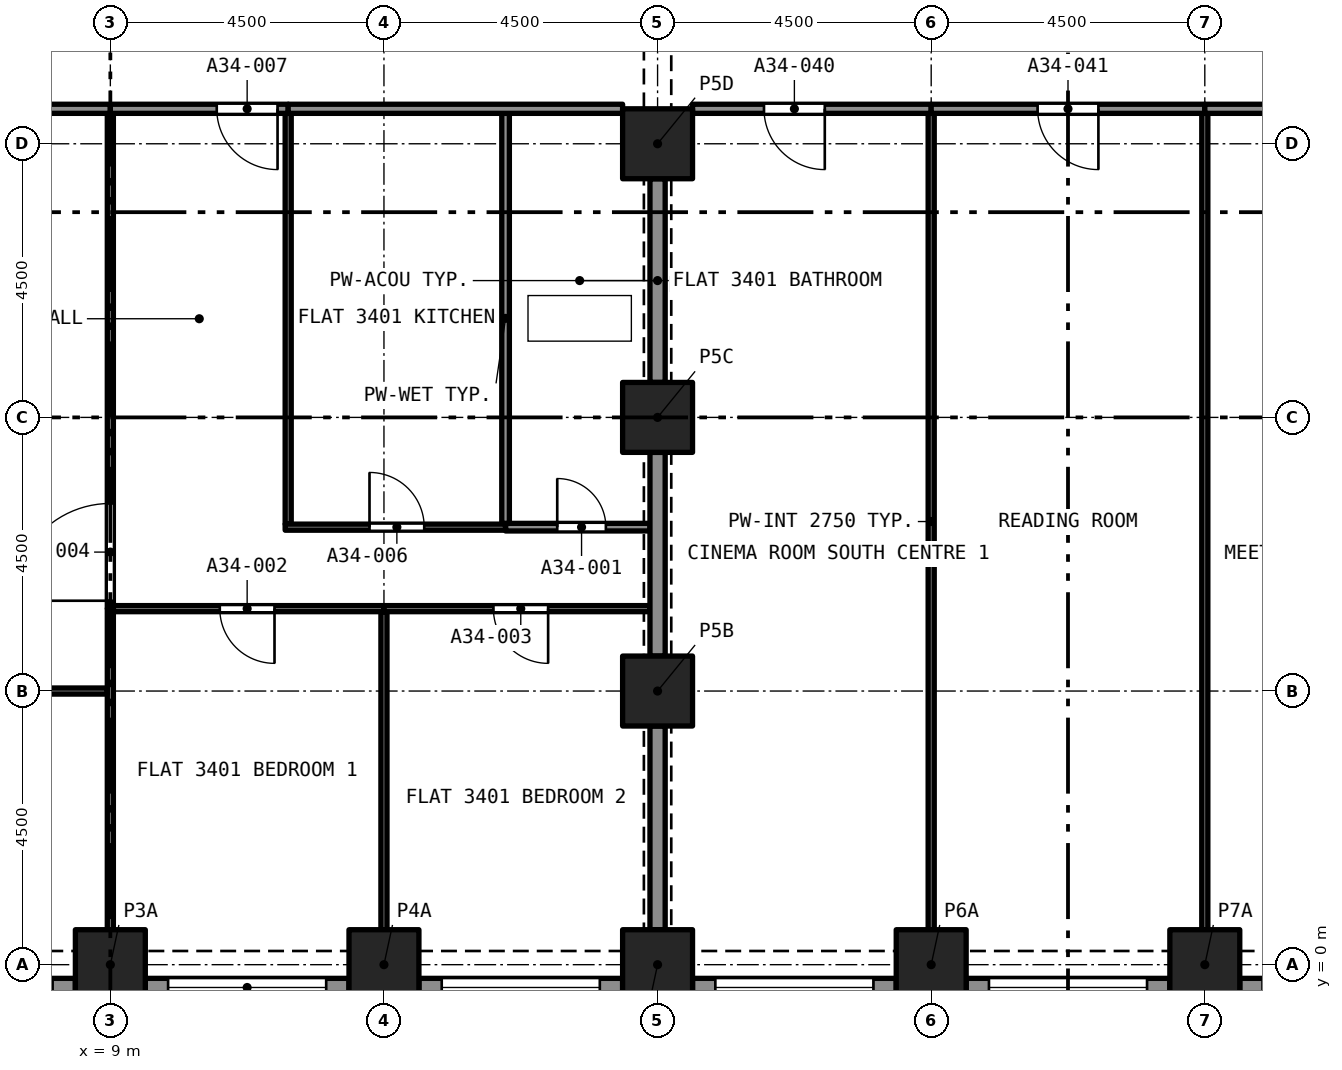
"""IFC4 building model, lengths in metres.
Left out: names, types, materials, properties, quantities, classifications, styles, units other than length and angle.
Written with IfcOpenShell. Run it as: python <this file> out.ifc"""

import sys

from ifc_helpers import new_model, si_unit, direction, frame, frame_2d, origin, origin_2d, place, context, subcontext, project, spatial, rectangle, extrude, element, fill, save


model = new_model("IFC4")
c1 = context("Model", 3, precision=1e-05, world=origin(), true_north=direction((0.0, 1.0)))
c2 = subcontext(c1, "Body", "Model", "MODEL_VIEW")
j1 = project(units=[si_unit("LENGTHUNIT", "METRE"), si_unit("PLANEANGLEUNIT", "RADIAN")], contexts=[c1])
p1 = place(None, origin())
s1 = spatial("IfcSite", under=j1, at=p1, CompositionType="ELEMENT")
p2 = place(p1, origin())
s2 = spatial("IfcBuilding", under=s1, at=p2, CompositionType="ELEMENT")
p3 = place(p2, frame((0.0, 0.0, 121.6)))
s3 = spatial("IfcBuildingStorey", under=s2, at=p3, CompositionType="ELEMENT", Elevation=121.6)
for number, where, z_axis, x_axis in (
    (1, (9.0, 0.0, 0.0), (0.0, 0.0, 1.0), (1.0, 0.0, 0.0)),
    (2, (13.5, 0.0, 0.0), (0.0, 0.0, 1.0), (1.0, 0.0, 0.0)),
    (3, (18.0, 0.0, 0.0), (0.0, 0.0, 1.0), (1.0, 0.0, 0.0)),
    (4, (22.5, 0.0, 0.0), (0.0, 0.0, 1.0), (1.0, 0.0, 0.0)),
    (5, (27.0, 0.0, 0.0), (0.0, 0.0, 1.0), (1.0, 0.0, 0.0)),
    (6, (18.0, 4.5, 0.0), (0.0, 0.0, 1.0), (1.0, 0.0, 0.0)),
    (7, (18.0, 9.0, 0.0), (0.0, 0.0, 1.0), (1.0, 0.0, 0.0)),
    (8, (18.0, 13.5, 0.0), (0.0, 0.0, 1.0), (1.0, 0.0, 0.0)),
):
    element("IfcColumn", number, at=place(p3, frame(where, z_axis=z_axis, x_axis=x_axis)), inside=s3, PredefinedType="COLUMN", context=c2, shape_type="SweptSolid", body=[
        extrude(rectangle(XDim=1.15, YDim=1.15, at=origin_2d()), origin(), (0.0, 0.0, 1.0), 3.2),
    ])
p4 = place(p3, frame((8.425, -0.375, 0.0), z_axis=(0.0, 0.0, 1.0), x_axis=(-1.0, 0.0, 0.0)))
e9 = element("IfcWall", 9, at=p4, inside=s3, PredefinedType="SOLIDWALL", context=c2, shape_type="SweptSolid", body=[
    extrude(rectangle(XDim=3.35, YDim=0.3, at=frame_2d((1.675, 0.0))), origin(), (0.0, 0.0, 1.0), 3.2),
])
p5 = place(p4, frame((0.375, 0.0, 0.45)))
e10 = element("IfcOpeningElement", 10, at=p5, cuts=e9, PredefinedType="OPENING", context=c2, shape_type="SweptSolid", body=[
    extrude(rectangle(XDim=2.6, YDim=1.95, at=frame_2d((1.3, 0.975))), frame((0.0, 0.16, 0.0), z_axis=(0.0, -1.0, 0.0), x_axis=(1.0, 0.0, 0.0)), (0.0, 0.0, 1.0), 0.32),
])
p6 = place(p3, frame((12.925, -0.375, 0.0), z_axis=(0.0, 0.0, 1.0), x_axis=(-1.0, 0.0, 0.0)))
e11 = element("IfcWall", 11, at=p6, inside=s3, PredefinedType="SOLIDWALL", context=c2, shape_type="SweptSolid", body=[
    extrude(rectangle(XDim=3.35, YDim=0.3, at=frame_2d((1.675, 0.0))), origin(), (0.0, 0.0, 1.0), 3.2),
])
p7 = place(p6, frame((0.375, 0.0, 0.45)))
e12 = element("IfcOpeningElement", 12, at=p7, cuts=e11, PredefinedType="OPENING", context=c2, shape_type="SweptSolid", body=[
    extrude(rectangle(XDim=2.6, YDim=1.95, at=frame_2d((1.3, 0.975))), frame((0.0, 0.16, 0.0), z_axis=(0.0, -1.0, 0.0), x_axis=(1.0, 0.0, 0.0)), (0.0, 0.0, 1.0), 0.32),
])
p8 = place(p3, frame((17.425, -0.375, 0.0), z_axis=(0.0, 0.0, 1.0), x_axis=(-1.0, 0.0, 0.0)))
e13 = element("IfcWall", 13, at=p8, inside=s3, PredefinedType="SOLIDWALL", context=c2, shape_type="SweptSolid", body=[
    extrude(rectangle(XDim=3.35, YDim=0.3, at=frame_2d((1.675, 0.0))), origin(), (0.0, 0.0, 1.0), 3.2),
])
p9 = place(p8, frame((0.375, 0.0, 0.45)))
e14 = element("IfcOpeningElement", 14, at=p9, cuts=e13, PredefinedType="OPENING", context=c2, shape_type="SweptSolid", body=[
    extrude(rectangle(XDim=2.6, YDim=1.95, at=frame_2d((1.3, 0.975))), frame((0.0, 0.16, 0.0), z_axis=(0.0, -1.0, 0.0), x_axis=(1.0, 0.0, 0.0)), (0.0, 0.0, 1.0), 0.32),
])
p10 = place(p3, frame((21.925, -0.375, 0.0), z_axis=(0.0, 0.0, 1.0), x_axis=(-1.0, 0.0, 0.0)))
e15 = element("IfcWall", 15, at=p10, inside=s3, PredefinedType="SOLIDWALL", context=c2, shape_type="SweptSolid", body=[
    extrude(rectangle(XDim=3.35, YDim=0.3, at=frame_2d((1.675, 0.0))), origin(), (0.0, 0.0, 1.0), 3.2),
])
p11 = place(p10, frame((0.375, 0.0, 0.45)))
e16 = element("IfcOpeningElement", 16, at=p11, cuts=e15, PredefinedType="OPENING", context=c2, shape_type="SweptSolid", body=[
    extrude(rectangle(XDim=2.6, YDim=1.95, at=frame_2d((1.3, 0.975))), frame((0.0, 0.16, 0.0), z_axis=(0.0, -1.0, 0.0), x_axis=(1.0, 0.0, 0.0)), (0.0, 0.0, 1.0), 0.32),
])
p12 = place(p3, frame((26.425, -0.375, 0.0), z_axis=(0.0, 0.0, 1.0), x_axis=(-1.0, 0.0, 0.0)))
e17 = element("IfcWall", 17, at=p12, inside=s3, PredefinedType="SOLIDWALL", context=c2, shape_type="SweptSolid", body=[
    extrude(rectangle(XDim=3.35, YDim=0.3, at=frame_2d((1.675, 0.0))), origin(), (0.0, 0.0, 1.0), 3.2),
])
p13 = place(p12, frame((0.375, 0.0, 0.45)))
e18 = element("IfcOpeningElement", 18, at=p13, cuts=e17, PredefinedType="OPENING", context=c2, shape_type="SweptSolid", body=[
    extrude(rectangle(XDim=2.6, YDim=1.95, at=frame_2d((1.3, 0.975))), frame((0.0, 0.16, 0.0), z_axis=(0.0, -1.0, 0.0), x_axis=(1.0, 0.0, 0.0)), (0.0, 0.0, 1.0), 0.32),
])
p14 = place(p3, frame((30.925, -0.375, 0.0), z_axis=(0.0, 0.0, 1.0), x_axis=(-1.0, 0.0, 0.0)))
e19 = element("IfcWall", 19, at=p14, inside=s3, PredefinedType="SOLIDWALL", context=c2, shape_type="SweptSolid", body=[
    extrude(rectangle(XDim=3.35, YDim=0.3, at=frame_2d((1.675, 0.0))), origin(), (0.0, 0.0, 1.0), 3.2),
])
p15 = place(p14, frame((0.375, 0.0, 0.45)))
e20 = element("IfcOpeningElement", 20, at=p15, cuts=e19, PredefinedType="OPENING", context=c2, shape_type="SweptSolid", body=[
    extrude(rectangle(XDim=2.6, YDim=1.95, at=frame_2d((1.3, 0.975))), frame((0.0, 0.16, 0.0), z_axis=(0.0, -1.0, 0.0), x_axis=(1.0, 0.0, 0.0)), (0.0, 0.0, 1.0), 0.32),
])
p16 = place(p3, frame((15.5, 7.195, 0.0), z_axis=(0.0, 0.0, 1.0), x_axis=(1.0, 0.0, 0.0)))
e21 = element("IfcWall", 21, at=p16, inside=s3, PredefinedType="PARTITIONING", context=c2, shape_type="SweptSolid", body=[
    extrude(rectangle(XDim=2.375, YDim=0.125, at=frame_2d((1.188, 0.0))), origin(), (0.0, 0.0, 1.0), 2.85),
])
p17 = place(p16, frame((0.85, 0.0, 0.0)))
e22 = element("IfcOpeningElement", 22, at=p17, cuts=e21, PredefinedType="OPENING", context=c2, shape_type="SweptSolid", body=[
    extrude(rectangle(XDim=0.8, YDim=2.1, at=frame_2d((0.4, 1.05))), frame((0.0, 0.073, 0.0), z_axis=(0.0, -1.0, 0.0), x_axis=(1.0, 0.0, 0.0)), (0.0, 0.0, 1.0), 0.145),
])
p18 = place(p3, frame((15.5, 7.258, 0.0), z_axis=(0.0, 0.0, 1.0), x_axis=(0.0, 1.0, 0.0)))
e23 = element("IfcWall", 23, at=p18, inside=s3, PredefinedType="PARTITIONING", context=c2, shape_type="SweptSolid", body=[
    extrude(rectangle(XDim=6.742, YDim=0.125, at=frame_2d((3.371, 0.0))), origin(), (0.0, 0.0, 1.0), 2.85),
])
p19 = place(p3, frame((18.0, 9.575, 0.0), z_axis=(0.0, 0.0, 1.0), x_axis=(0.0, 1.0, 0.0)))
e24 = element("IfcWall", 24, at=p19, inside=s3, PredefinedType="PARTITIONING", context=c2, shape_type="SweptSolid", body=[
    extrude(rectangle(XDim=3.35, YDim=0.25, at=frame_2d((1.675, 0.0))), origin(), (0.0, 0.0, 1.0), 2.38),
])
p20 = place(p3, frame((13.5, 0.575, 0.0), z_axis=(0.0, 0.0, 1.0), x_axis=(0.0, 1.0, 0.0)))
e25 = element("IfcWall", 25, at=p20, inside=s3, PredefinedType="PARTITIONING", context=c2, shape_type="SweptSolid", body=[
    extrude(rectangle(XDim=5.23, YDim=0.1, at=frame_2d((2.615, 0.0))), origin(), (0.0, 0.0, 1.0), 2.85),
])
p21 = place(p3, frame((13.5, 5.855, 0.0), z_axis=(0.0, 0.0, 1.0), x_axis=(-1.0, 0.0, 0.0)))
e26 = element("IfcWall", 26, at=p21, inside=s3, PredefinedType="PARTITIONING", context=c2, shape_type="SweptSolid", body=[
    extrude(rectangle(XDim=4.45, YDim=0.1, at=frame_2d((2.225, 0.0))), origin(), (0.0, 0.0, 1.0), 2.85),
])
p22 = place(p21, frame((1.8, 0.0, 0.0)))
e27 = element("IfcOpeningElement", 27, at=p22, cuts=e26, PredefinedType="OPENING", context=c2, shape_type="SweptSolid", body=[
    extrude(rectangle(XDim=0.9, YDim=2.1, at=frame_2d((0.45, 1.05))), frame((0.0, 0.06, 0.0), z_axis=(0.0, -1.0, 0.0), x_axis=(1.0, 0.0, 0.0)), (0.0, 0.0, 1.0), 0.12),
])
p23 = place(p3, frame((9.0, 0.575, 0.0), z_axis=(0.0, 0.0, 1.0), x_axis=(0.0, 1.0, 0.0)))
e28 = element("IfcWall", 28, at=p23, inside=s3, PredefinedType="PARTITIONING", context=c2, shape_type="SweptSolid", body=[
    extrude(rectangle(XDim=5.28, YDim=0.1, at=frame_2d((2.64, 0.0))), origin(), (0.0, 0.0, 1.0), 2.85),
])
p24 = place(p3, frame((17.875, 5.855, 0.0), z_axis=(0.0, 0.0, 1.0), x_axis=(-1.0, 0.0, 0.0)))
e29 = element("IfcWall", 29, at=p24, inside=s3, PredefinedType="PARTITIONING", context=c2, shape_type="SweptSolid", body=[
    extrude(rectangle(XDim=4.375, YDim=0.1, at=frame_2d((2.188, 0.0))), origin(), (0.0, 0.0, 1.0), 2.85),
])
p25 = place(p24, frame((1.675, 0.0, 0.0)))
e30 = element("IfcOpeningElement", 30, at=p25, cuts=e29, PredefinedType="OPENING", context=c2, shape_type="SweptSolid", body=[
    extrude(rectangle(XDim=0.9, YDim=2.1, at=frame_2d((0.45, 1.05))), frame((0.0, 0.06, 0.0), z_axis=(0.0, -1.0, 0.0), x_axis=(1.0, 0.0, 0.0)), (0.0, 0.0, 1.0), 0.12),
])
for number, where, z_axis, x_axis in (
    (31, (18.0, 5.075, 0.0), (0.0, 0.0, 1.0), (0.0, 1.0, 0.0)),
    (32, (18.0, 0.575, 0.0), (0.0, 0.0, 1.0), (0.0, 1.0, 0.0)),
):
    element("IfcWall", number, at=place(p3, frame(where, z_axis=z_axis, x_axis=x_axis)), inside=s3, PredefinedType="PARTITIONING", context=c2, shape_type="SweptSolid", body=[
        extrude(rectangle(XDim=3.35, YDim=0.25, at=frame_2d((1.675, 0.0))), origin(), (0.0, 0.0, 1.0), 2.38),
    ])
p26 = place(p3, frame((9.0, 5.855, 0.0), z_axis=(0.0, 0.0, 1.0), x_axis=(0.0, 1.0, 0.0)))
e33 = element("IfcWall", 33, at=p26, inside=s3, PredefinedType="PARTITIONING", context=c2, shape_type="SweptSolid", body=[
    extrude(rectangle(XDim=8.145, YDim=0.1, at=frame_2d((4.073, 0.0))), origin(), (0.0, 0.0, 1.0), 2.85),
])
p27 = place(p26, frame((0.13, 0.0, 0.0)))
e34 = element("IfcOpeningElement", 34, at=p27, cuts=e33, PredefinedType="OPENING", context=c2, shape_type="SweptSolid", body=[
    extrude(rectangle(XDim=1.6, YDim=2.1, at=frame_2d((0.8, 1.05))), frame((0.0, 0.06, 0.0), z_axis=(0.0, -1.0, 0.0), x_axis=(1.0, 0.0, 0.0)), (0.0, 0.0, 1.0), 0.12),
])
p28 = place(p3, frame((0.622, 4.5, 0.0), z_axis=(0.0, 0.0, 1.0), x_axis=(1.0, 0.0, 0.0)))
e35 = element("IfcWall", 35, at=p28, inside=s3, PredefinedType="PARTITIONING", context=c2, shape_type="SweptSolid", body=[
    extrude(rectangle(XDim=8.328, YDim=0.1, at=frame_2d((4.164, 0.0))), origin(), (0.0, 0.0, 1.0), 2.85),
])
p29 = place(p28, frame((3.365, 0.0, 0.0)))
e36 = element("IfcOpeningElement", 36, at=p29, cuts=e35, PredefinedType="OPENING", context=c2, shape_type="SweptSolid", body=[
    extrude(rectangle(XDim=1.6, YDim=2.1, at=frame_2d((0.8, 1.05))), frame((0.0, 0.06, 0.0), z_axis=(0.0, -1.0, 0.0), x_axis=(1.0, 0.0, 0.0)), (0.0, 0.0, 1.0), 0.12),
])
p30 = place(p3, frame((0.575, 14.075, 0.0), z_axis=(0.0, 0.0, 1.0), x_axis=(1.0, 0.0, 0.0)))
e37 = element("IfcWall", 37, at=p30, inside=s3, PredefinedType="PARTITIONING", context=c2, shape_type="SweptSolid", body=[
    extrude(rectangle(XDim=8.425, YDim=0.15, at=frame_2d((4.212, 0.0))), origin(), (0.0, 0.0, 1.0), 2.85),
])
p31 = place(p3, frame((11.925, 7.245, 0.0), z_axis=(0.0, 0.0, 1.0), x_axis=(0.0, 1.0, 0.0)))
e38 = element("IfcWall", 38, at=p31, inside=s3, PredefinedType="PARTITIONING", context=c2, shape_type="SweptSolid", body=[
    extrude(rectangle(XDim=6.755, YDim=0.1, at=frame_2d((3.377, 0.0))), origin(), (0.0, 0.0, 1.0), 2.85),
])
p32 = place(p3, frame((11.875, 7.195, 0.0), z_axis=(0.0, 0.0, 1.0), x_axis=(1.0, 0.0, 0.0)))
e39 = element("IfcWall", 39, at=p32, inside=s3, PredefinedType="PARTITIONING", context=c2, shape_type="SweptSolid", body=[
    extrude(rectangle(XDim=3.625, YDim=0.1, at=frame_2d((1.812, 0.0))), origin(), (0.0, 0.0, 1.0), 2.85),
])
p33 = place(p32, frame((1.387, 0.0, 0.0)))
e40 = element("IfcOpeningElement", 40, at=p33, cuts=e39, PredefinedType="OPENING", context=c2, shape_type="SweptSolid", body=[
    extrude(rectangle(XDim=0.9, YDim=2.1, at=frame_2d((0.45, 1.05))), frame((0.0, 0.06, 0.0), z_axis=(0.0, -1.0, 0.0), x_axis=(1.0, 0.0, 0.0)), (0.0, 0.0, 1.0), 0.12),
])
p34 = place(p3, frame((11.925, 14.075, 0.0), z_axis=(0.0, 0.0, 1.0), x_axis=(-1.0, 0.0, 0.0)))
e41 = element("IfcWall", 41, at=p34, inside=s3, PredefinedType="PARTITIONING", context=c2, shape_type="SweptSolid", body=[
    extrude(rectangle(XDim=2.925, YDim=0.15, at=frame_2d((1.462, 0.0))), origin(), (0.0, 0.0, 1.0), 2.85),
])
p35 = place(p34, frame((0.175, 0.0, 0.0)))
e42 = element("IfcOpeningElement", 42, at=p35, cuts=e41, PredefinedType="OPENING", context=c2, shape_type="SweptSolid", body=[
    extrude(rectangle(XDim=1.0, YDim=2.1, at=frame_2d((0.5, 1.05))), frame((0.0, 0.085, 0.0), z_axis=(0.0, -1.0, 0.0), x_axis=(1.0, 0.0, 0.0)), (0.0, 0.0, 1.0), 0.17),
])
p36 = place(p3, frame((11.925, 14.075, 0.0), z_axis=(0.0, 0.0, 1.0), x_axis=(1.0, 0.0, 0.0)))
e43 = element("IfcWall", 43, at=p36, inside=s3, PredefinedType="PARTITIONING", context=c2, shape_type="SweptSolid", body=[
    extrude(rectangle(XDim=5.5, YDim=0.15, at=frame_2d((2.75, 0.0))), origin(), (0.0, 0.0, 1.0), 2.85),
])
p37 = place(p3, frame((22.5, 0.575, 0.0), z_axis=(0.0, 0.0, 1.0), x_axis=(0.0, 1.0, 0.0)))
e44 = element("IfcWall", 44, at=p37, inside=s3, PredefinedType="PARTITIONING", context=c2, shape_type="SweptSolid", body=[
    extrude(rectangle(XDim=13.425, YDim=0.1, at=frame_2d((6.712, 0.0))), origin(), (0.0, 0.0, 1.0), 2.75),
])
p38 = place(p3, frame((22.5, 14.075, 0.0), z_axis=(0.0, 0.0, 1.0), x_axis=(-1.0, 0.0, 0.0)))
e45 = element("IfcWall", 45, at=p38, inside=s3, PredefinedType="PARTITIONING", context=c2, shape_type="SweptSolid", body=[
    extrude(rectangle(XDim=3.925, YDim=0.15, at=frame_2d((1.962, 0.0))), origin(), (0.0, 0.0, 1.0), 2.75),
])
p39 = place(p38, frame((1.75, 0.0, 0.0)))
e46 = element("IfcOpeningElement", 46, at=p39, cuts=e45, PredefinedType="OPENING", context=c2, shape_type="SweptSolid", body=[
    extrude(rectangle(XDim=1.0, YDim=2.1, at=frame_2d((0.5, 1.05))), frame((0.0, 0.085, 0.0), z_axis=(0.0, -1.0, 0.0), x_axis=(1.0, 0.0, 0.0)), (0.0, 0.0, 1.0), 0.17),
])
p40 = place(p3, frame((27.0, 0.575, 0.0), z_axis=(0.0, 0.0, 1.0), x_axis=(0.0, 1.0, 0.0)))
e47 = element("IfcWall", 47, at=p40, inside=s3, PredefinedType="PARTITIONING", context=c2, shape_type="SweptSolid", body=[
    extrude(rectangle(XDim=13.425, YDim=0.1, at=frame_2d((6.712, 0.0))), origin(), (0.0, 0.0, 1.0), 2.75),
])
p41 = place(p3, frame((27.0, 14.075, 0.0), z_axis=(0.0, 0.0, 1.0), x_axis=(-1.0, 0.0, 0.0)))
e48 = element("IfcWall", 48, at=p41, inside=s3, PredefinedType="PARTITIONING", context=c2, shape_type="SweptSolid", body=[
    extrude(rectangle(XDim=4.5, YDim=0.15, at=frame_2d((2.25, 0.0))), origin(), (0.0, 0.0, 1.0), 2.75),
])
p42 = place(p41, frame((1.75, 0.0, 0.0)))
e49 = element("IfcOpeningElement", 49, at=p42, cuts=e48, PredefinedType="OPENING", context=c2, shape_type="SweptSolid", body=[
    extrude(rectangle(XDim=1.0, YDim=2.1, at=frame_2d((0.5, 1.05))), frame((0.0, 0.085, 0.0), z_axis=(0.0, -1.0, 0.0), x_axis=(1.0, 0.0, 0.0)), (0.0, 0.0, 1.0), 0.17),
])
p43 = place(p3, frame((30.925, 14.075, 0.0), z_axis=(0.0, 0.0, 1.0), x_axis=(-1.0, 0.0, 0.0)))
e50 = element("IfcWall", 50, at=p43, inside=s3, PredefinedType="PARTITIONING", context=c2, shape_type="SweptSolid", body=[
    extrude(rectangle(XDim=3.925, YDim=0.15, at=frame_2d((1.962, 0.0))), origin(), (0.0, 0.0, 1.0), 2.75),
])
p44 = place(p43, frame((1.175, 0.0, 0.0)))
e51 = element("IfcOpeningElement", 51, at=p44, cuts=e50, PredefinedType="OPENING", context=c2, shape_type="SweptSolid", body=[
    extrude(rectangle(XDim=1.0, YDim=2.1, at=frame_2d((0.5, 1.05))), frame((0.0, 0.085, 0.0), z_axis=(0.0, -1.0, 0.0), x_axis=(1.0, 0.0, 0.0)), (0.0, 0.0, 1.0), 0.17),
])
p45 = place(p7, origin())
e52 = element("IfcWindow", 52, at=p45, inside=s3, PartitioningType="SINGLE_PANEL", PredefinedType="WINDOW", context=c2, shape_type="SweptSolid", body=[
    extrude(rectangle(XDim=2.6, YDim=1.95, at=frame_2d((1.3, 0.975))), frame((0.0, 0.03, 0.0), z_axis=(0.0, -1.0, 0.0), x_axis=(1.0, 0.0, 0.0)), (0.0, 0.0, 1.0), 0.06),
])
fill(e12, e52)
p46 = place(p9, origin())
e53 = element("IfcWindow", 53, at=p46, inside=s3, PartitioningType="SINGLE_PANEL", PredefinedType="WINDOW", context=c2, shape_type="SweptSolid", body=[
    extrude(rectangle(XDim=2.6, YDim=1.95, at=frame_2d((1.3, 0.975))), frame((0.0, 0.03, 0.0), z_axis=(0.0, -1.0, 0.0), x_axis=(1.0, 0.0, 0.0)), (0.0, 0.0, 1.0), 0.06),
])
fill(e14, e53)
p47 = place(p11, origin())
e54 = element("IfcWindow", 54, at=p47, inside=s3, PartitioningType="SINGLE_PANEL", PredefinedType="WINDOW", context=c2, shape_type="SweptSolid", body=[
    extrude(rectangle(XDim=2.6, YDim=1.95, at=frame_2d((1.3, 0.975))), frame((0.0, 0.03, 0.0), z_axis=(0.0, -1.0, 0.0), x_axis=(1.0, 0.0, 0.0)), (0.0, 0.0, 1.0), 0.06),
])
fill(e16, e54)
p48 = place(p13, origin())
e55 = element("IfcWindow", 55, at=p48, inside=s3, PartitioningType="SINGLE_PANEL", PredefinedType="WINDOW", context=c2, shape_type="SweptSolid", body=[
    extrude(rectangle(XDim=2.6, YDim=1.95, at=frame_2d((1.3, 0.975))), frame((0.0, 0.03, 0.0), z_axis=(0.0, -1.0, 0.0), x_axis=(1.0, 0.0, 0.0)), (0.0, 0.0, 1.0), 0.06),
])
fill(e18, e55)
p49 = place(p17, origin())
e56 = element("IfcDoor", 56, at=p49, inside=s3, OperationType="SINGLE_SWING_RIGHT", PredefinedType="DOOR", context=c2, shape_type="SweptSolid", body=[
    extrude(rectangle(XDim=0.8, YDim=2.1, at=frame_2d((0.4, 1.05))), frame((0.0, 0.025, 0.0), z_axis=(0.0, -1.0, 0.0), x_axis=(1.0, 0.0, 0.0)), (0.0, 0.0, 1.0), 0.05),
])
fill(e22, e56)
p50 = place(p22, origin())
e57 = element("IfcDoor", 57, at=p50, inside=s3, OperationType="SINGLE_SWING_RIGHT", PredefinedType="DOOR", context=c2, shape_type="SweptSolid", body=[
    extrude(rectangle(XDim=0.9, YDim=2.1, at=frame_2d((0.45, 1.05))), frame((0.0, 0.025, 0.0), z_axis=(0.0, -1.0, 0.0), x_axis=(1.0, 0.0, 0.0)), (0.0, 0.0, 1.0), 0.05),
])
fill(e27, e57)
p51 = place(p25, origin())
e58 = element("IfcDoor", 58, at=p51, inside=s3, OperationType="SINGLE_SWING_LEFT", PredefinedType="DOOR", context=c2, shape_type="SweptSolid", body=[
    extrude(rectangle(XDim=0.9, YDim=2.1, at=frame_2d((0.45, 1.05))), frame((0.0, 0.025, 0.0), z_axis=(0.0, -1.0, 0.0), x_axis=(1.0, 0.0, 0.0)), (0.0, 0.0, 1.0), 0.05),
])
fill(e30, e58)
p52 = place(p27, origin())
e59 = element("IfcDoor", 59, at=p52, inside=s3, OperationType="SINGLE_SWING_LEFT", PredefinedType="DOOR", context=c2, shape_type="SweptSolid", body=[
    extrude(rectangle(XDim=1.6, YDim=2.1, at=frame_2d((0.8, 1.05))), frame((0.0, 0.025, 0.0), z_axis=(0.0, -1.0, 0.0), x_axis=(1.0, 0.0, 0.0)), (0.0, 0.0, 1.0), 0.05),
])
fill(e34, e59)
p53 = place(p33, origin())
e60 = element("IfcDoor", 60, at=p53, inside=s3, OperationType="SINGLE_SWING_RIGHT", PredefinedType="DOOR", context=c2, shape_type="SweptSolid", body=[
    extrude(rectangle(XDim=0.9, YDim=2.1, at=frame_2d((0.45, 1.05))), frame((0.0, 0.025, 0.0), z_axis=(0.0, -1.0, 0.0), x_axis=(1.0, 0.0, 0.0)), (0.0, 0.0, 1.0), 0.05),
])
fill(e40, e60)
p54 = place(p35, origin())
e61 = element("IfcDoor", 61, at=p54, inside=s3, OperationType="SINGLE_SWING_LEFT", PredefinedType="DOOR", context=c2, shape_type="SweptSolid", body=[
    extrude(rectangle(XDim=1.0, YDim=2.1, at=frame_2d((0.5, 1.05))), frame((0.0, 0.025, 0.0), z_axis=(0.0, -1.0, 0.0), x_axis=(1.0, 0.0, 0.0)), (0.0, 0.0, 1.0), 0.05),
])
fill(e42, e61)
p55 = place(p39, origin())
e62 = element("IfcDoor", 62, at=p55, inside=s3, OperationType="SINGLE_SWING_RIGHT", PredefinedType="DOOR", context=c2, shape_type="SweptSolid", body=[
    extrude(rectangle(XDim=1.0, YDim=2.1, at=frame_2d((0.5, 1.05))), frame((0.0, 0.025, 0.0), z_axis=(0.0, -1.0, 0.0), x_axis=(1.0, 0.0, 0.0)), (0.0, 0.0, 1.0), 0.05),
])
fill(e46, e62)
p56 = place(p42, origin())
e63 = element("IfcDoor", 63, at=p56, inside=s3, OperationType="SINGLE_SWING_RIGHT", PredefinedType="DOOR", context=c2, shape_type="SweptSolid", body=[
    extrude(rectangle(XDim=1.0, YDim=2.1, at=frame_2d((0.5, 1.05))), frame((0.0, 0.025, 0.0), z_axis=(0.0, -1.0, 0.0), x_axis=(1.0, 0.0, 0.0)), (0.0, 0.0, 1.0), 0.05),
])
fill(e49, e63)
save(model, sys.argv[1])
